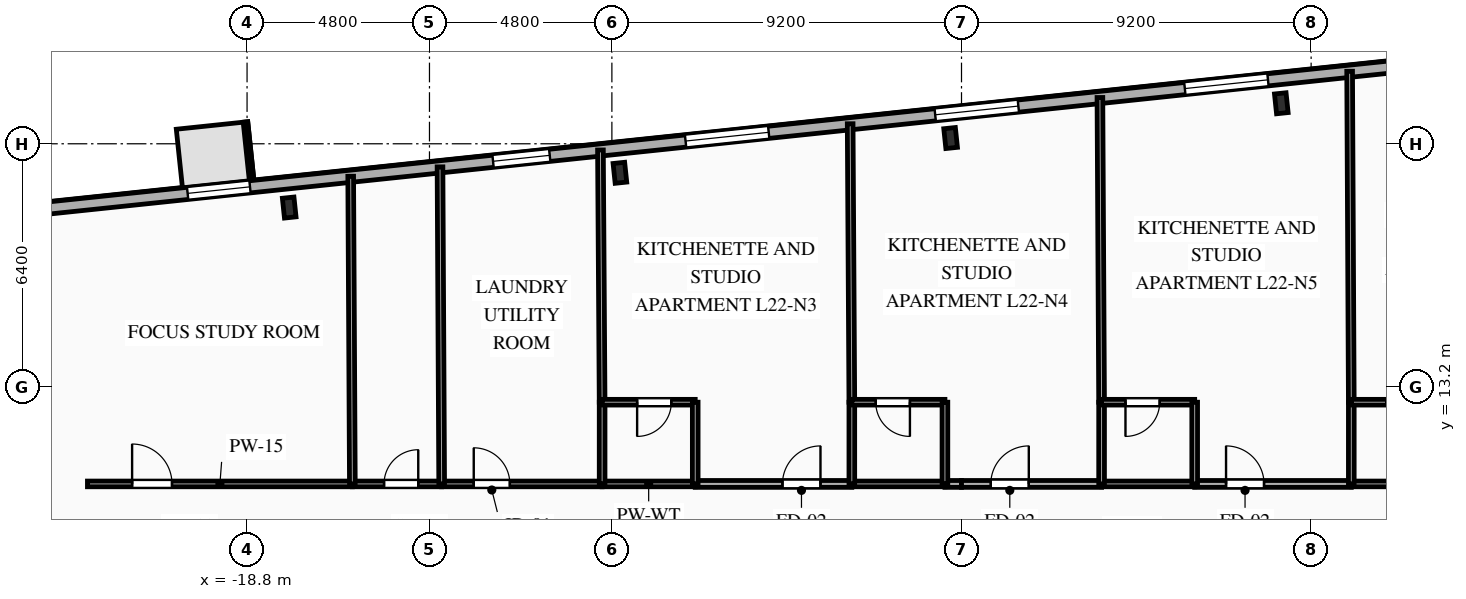
"""IFC4 building model, lengths in metres.
Left out: names, types, materials, properties, quantities, classifications, styles, units other than length and angle.
Written with IfcOpenShell. Run it as: python <this file> out.ifc"""

import sys

from ifc_helpers import new_model, si_unit, direction, frame, frame_2d, origin, origin_2d, place, context, subcontext, project, spatial, rectangle, i_section, extrude, element, fill, save


model = new_model("IFC4")
c1 = context("Model", 3, precision=1e-05, world=origin(), true_north=direction((0.0, 1.0)))
c2 = subcontext(c1, "Body", "Model", "MODEL_VIEW")
j1 = project(units=[si_unit("LENGTHUNIT", "METRE"), si_unit("PLANEANGLEUNIT", "RADIAN")], contexts=[c1])
p1 = place(None, origin())
s1 = spatial("IfcSite", under=j1, at=p1, CompositionType="ELEMENT")
p2 = place(p1, origin())
s2 = spatial("IfcBuilding", under=s1, at=p2, CompositionType="ELEMENT")
p3 = place(p2, frame((0.0, 0.0, 82.35)))
s3 = spatial("IfcBuildingStorey", under=s2, at=p3, CompositionType="ELEMENT", Elevation=82.35)
for number, where, z_axis, x_axis in (
    (1, (8.415, 20.666, 0.0), (0.0, 0.0, 1.0), (0.995, 0.105, 0.0)),
    (2, (-0.287, 19.751, 0.0), (0.0, 0.0, 1.0), (0.995, 0.105, 0.0)),
    (3, (-8.989, 18.836, 0.0), (0.0, 0.0, 1.0), (0.995, 0.105, 0.0)),
    (4, (-17.691, 17.922, 0.0), (0.0, 0.0, 1.0), (0.995, 0.105, 0.0)),
):
    element("IfcColumn", number, at=place(p3, frame(where, z_axis=z_axis, x_axis=x_axis)), inside=s3, PredefinedType="COLUMN", context=c2, shape_type="SweptSolid", body=[
        extrude(i_section(OverallWidth=0.306, OverallDepth=0.524, WebThickness=0.021, FlangeThickness=0.04, FilletRadius=0.027, at=origin_2d()), origin(), (0.0, 0.0, 1.0), 3.35),
    ])
p4 = place(p3, frame((-27.107, 17.586, 0.0), z_axis=(0.0, 0.0, 1.0), x_axis=(0.994521628355, 0.104531003701, 0.0)))
e5 = element("IfcWall", 5, at=p4, inside=s3, PredefinedType="SOLIDWALL", context=c2, shape_type="SweptSolid", body=[
    extrude(rectangle(XDim=53.8, YDim=0.32, at=frame_2d((26.9, 0.0))), origin(), (0.0, 0.0, 1.0), 3.045),
])
p5 = place(p4, frame((6.781, 0.0, 0.85)))
e6 = element("IfcOpeningElement", 6, at=p5, cuts=e5, PredefinedType="OPENING", context=c2, shape_type="SweptSolid", body=[
    extrude(rectangle(XDim=1.65, YDim=1.85, at=frame_2d((0.825, 0.925))), frame((0.0, 0.17, 0.0), z_axis=(0.0, -1.0, 0.0), x_axis=(1.0, 0.0, 0.0)), (0.0, 0.0, 1.0), 0.34),
])
p6 = place(p4, frame((14.862, 0.0, 0.85)))
e7 = element("IfcOpeningElement", 7, at=p6, cuts=e5, PredefinedType="OPENING", context=c2, shape_type="SweptSolid", body=[
    extrude(rectangle(XDim=1.5, YDim=1.85, at=frame_2d((0.75, 0.925))), frame((0.0, 0.17, 0.0), z_axis=(0.0, -1.0, 0.0), x_axis=(1.0, 0.0, 0.0)), (0.0, 0.0, 1.0), 0.34),
])
p7 = place(p4, frame((19.956, 0.0, 0.85)))
e8 = element("IfcOpeningElement", 8, at=p7, cuts=e5, PredefinedType="OPENING", context=c2, shape_type="SweptSolid", body=[
    extrude(rectangle(XDim=2.2, YDim=1.85, at=frame_2d((1.1, 0.925))), frame((0.0, 0.17, 0.0), z_axis=(0.0, -1.0, 0.0), x_axis=(1.0, 0.0, 0.0)), (0.0, 0.0, 1.0), 0.34),
])
p8 = place(p4, frame((26.561, 0.0, 0.85)))
e9 = element("IfcOpeningElement", 9, at=p8, cuts=e5, PredefinedType="OPENING", context=c2, shape_type="SweptSolid", body=[
    extrude(rectangle(XDim=2.2, YDim=1.85, at=frame_2d((1.1, 0.925))), frame((0.0, 0.17, 0.0), z_axis=(0.0, -1.0, 0.0), x_axis=(1.0, 0.0, 0.0)), (0.0, 0.0, 1.0), 0.34),
])
p9 = place(p4, frame((33.166, 0.0, 0.85)))
e10 = element("IfcOpeningElement", 10, at=p9, cuts=e5, PredefinedType="OPENING", context=c2, shape_type="SweptSolid", body=[
    extrude(rectangle(XDim=2.2, YDim=1.85, at=frame_2d((1.1, 0.925))), frame((0.0, 0.17, 0.0), z_axis=(0.0, -1.0, 0.0), x_axis=(1.0, 0.0, 0.0)), (0.0, 0.0, 1.0), 0.34),
])
p10 = place(p4, frame((39.771, 0.0, 0.85)))
e11 = element("IfcOpeningElement", 11, at=p10, cuts=e5, PredefinedType="OPENING", context=c2, shape_type="SweptSolid", body=[
    extrude(rectangle(XDim=2.2, YDim=1.85, at=frame_2d((1.1, 0.925))), frame((0.0, 0.17, 0.0), z_axis=(0.0, -1.0, 0.0), x_axis=(1.0, 0.0, 0.0)), (0.0, 0.0, 1.0), 0.34),
])
p11 = place(p4, frame((46.45, 0.0, 0.85)))
e12 = element("IfcOpeningElement", 12, at=p11, cuts=e5, PredefinedType="OPENING", context=c2, shape_type="SweptSolid", body=[
    extrude(rectangle(XDim=1.65, YDim=1.85, at=frame_2d((0.825, 0.925))), frame((0.0, 0.17, 0.0), z_axis=(0.0, -1.0, 0.0), x_axis=(1.0, 0.0, 0.0)), (0.0, 0.0, 1.0), 0.34),
])
p12 = place(p3, frame((-23.0, 10.65, 0.0), z_axis=(0.0, 0.0, 1.0), x_axis=(1.0, 0.0, 0.0)))
e13 = element("IfcWall", 13, at=p12, inside=s3, PredefinedType="PARTITIONING", context=c2, shape_type="SweptSolid", body=[
    extrude(rectangle(XDim=6.971, YDim=0.15, at=frame_2d((3.485, 0.0))), origin(), (0.0, 0.0, 1.0), 3.045),
])
p13 = place(p12, frame((1.175, 0.0, 0.0)))
e14 = element("IfcOpeningElement", 14, at=p13, cuts=e13, PredefinedType="OPENING", context=c2, shape_type="SweptSolid", body=[
    extrude(rectangle(XDim=1.05, YDim=2.15, at=frame_2d((0.525, 1.075))), frame((0.0, 0.085, 0.0), z_axis=(0.0, -1.0, 0.0), x_axis=(1.0, 0.0, 0.0)), (0.0, 0.0, 1.0), 0.17),
])
p14 = place(p3, frame((-16.029, 10.65, 0.0), z_axis=(0.0, 0.0, 1.0), x_axis=(1.0, 0.0, 0.0)))
e15 = element("IfcWall", 15, at=p14, inside=s3, PredefinedType="PLUMBINGWALL", context=c2, shape_type="SweptSolid", body=[
    extrude(rectangle(XDim=2.35, YDim=0.15, at=frame_2d((1.175, 0.0))), origin(), (0.0, 0.0, 1.0), 3.045),
])
p15 = place(p14, frame((0.834, 0.0, 0.0)))
e16 = element("IfcOpeningElement", 16, at=p15, cuts=e15, PredefinedType="OPENING", context=c2, shape_type="SweptSolid", body=[
    extrude(rectangle(XDim=0.9, YDim=2.1, at=frame_2d((0.45, 1.05))), frame((0.0, 0.085, 0.0), z_axis=(0.0, -1.0, 0.0), x_axis=(1.0, 0.0, 0.0)), (0.0, 0.0, 1.0), 0.17),
])
p16 = place(p3, frame((-13.679, 10.65, 0.0), z_axis=(0.0, 0.0, 1.0), x_axis=(1.0, 0.0, 0.0)))
e17 = element("IfcWall", 17, at=p16, inside=s3, PredefinedType="PARTITIONING", context=c2, shape_type="SweptSolid", body=[
    extrude(rectangle(XDim=4.222, YDim=0.15, at=frame_2d((2.111, 0.0))), origin(), (0.0, 0.0, 1.0), 3.045),
])
p17 = place(p16, frame((0.844, 0.0, 0.0)))
e18 = element("IfcOpeningElement", 18, at=p17, cuts=e17, PredefinedType="OPENING", context=c2, shape_type="SweptSolid", body=[
    extrude(rectangle(XDim=0.95, YDim=2.1, at=frame_2d((0.475, 1.05))), frame((0.0, 0.085, 0.0), z_axis=(0.0, -1.0, 0.0), x_axis=(1.0, 0.0, 0.0)), (0.0, 0.0, 1.0), 0.17),
])
p18 = place(p3, frame((-7.007, 10.65, 0.0), z_axis=(0.0, 0.0, 1.0), x_axis=(1.0, 0.0, 0.0)))
e19 = element("IfcWall", 19, at=p18, inside=s3, PredefinedType="PARTITIONING", context=c2, shape_type="SweptSolid", body=[
    extrude(rectangle(XDim=4.121, YDim=0.18, at=frame_2d((2.061, 0.0))), origin(), (0.0, 0.0, 1.0), 3.045),
])
p19 = place(p18, frame((2.296, 0.0, 0.0)))
e20 = element("IfcOpeningElement", 20, at=p19, cuts=e19, PredefinedType="OPENING", context=c2, shape_type="SweptSolid", body=[
    extrude(rectangle(XDim=1.0, YDim=2.15, at=frame_2d((0.5, 1.075))), frame((0.0, 0.1, 0.0), z_axis=(0.0, -1.0, 0.0), x_axis=(1.0, 0.0, 0.0)), (0.0, 0.0, 1.0), 0.2),
])
p20 = place(p3, frame((-9.457, 10.65, 0.0), z_axis=(0.0, 0.0, 1.0), x_axis=(1.0, 0.0, 0.0)))
e21 = element("IfcWall", 21, at=p20, inside=s3, PredefinedType="PLUMBINGWALL", context=c2, shape_type="SweptSolid", body=[
    extrude(rectangle(XDim=2.45, YDim=0.15, at=frame_2d((1.225, 0.0))), origin(), (0.0, 0.0, 1.0), 3.045),
])
p21 = place(p3, frame((-0.436, 10.65, 0.0), z_axis=(0.0, 0.0, 1.0), x_axis=(1.0, 0.0, 0.0)))
e22 = element("IfcWall", 22, at=p21, inside=s3, PredefinedType="PARTITIONING", context=c2, shape_type="SweptSolid", body=[
    extrude(rectangle(XDim=0.436, YDim=0.18, at=frame_2d((0.218, 0.0))), origin(), (0.0, 0.0, 1.0), 3.045),
])
p22 = place(p3, frame((-2.886, 10.65, 0.0), z_axis=(0.0, 0.0, 1.0), x_axis=(1.0, 0.0, 0.0)))
e23 = element("IfcWall", 23, at=p22, inside=s3, PredefinedType="PLUMBINGWALL", context=c2, shape_type="SweptSolid", body=[
    extrude(rectangle(XDim=2.45, YDim=0.15, at=frame_2d((1.225, 0.0))), origin(), (0.0, 0.0, 1.0), 3.045),
])
p23 = place(p3, frame((0.0, 10.65, 0.0), z_axis=(0.0, 0.0, 1.0), x_axis=(1.0, 0.0, 0.0)))
e24 = element("IfcWall", 24, at=p23, inside=s3, PredefinedType="PARTITIONING", context=c2, shape_type="SweptSolid", body=[
    extrude(rectangle(XDim=3.686, YDim=0.18, at=frame_2d((1.843, 0.0))), origin(), (0.0, 0.0, 1.0), 3.045),
])
p24 = place(p23, frame((0.771, 0.0, 0.0)))
e25 = element("IfcOpeningElement", 25, at=p24, cuts=e24, PredefinedType="OPENING", context=c2, shape_type="SweptSolid", body=[
    extrude(rectangle(XDim=1.0, YDim=2.15, at=frame_2d((0.5, 1.075))), frame((0.0, 0.1, 0.0), z_axis=(0.0, -1.0, 0.0), x_axis=(1.0, 0.0, 0.0)), (0.0, 0.0, 1.0), 0.2),
])
p25 = place(p3, frame((6.136, 10.65, 0.0), z_axis=(0.0, 0.0, 1.0), x_axis=(1.0, 0.0, 0.0)))
e26 = element("IfcWall", 26, at=p25, inside=s3, PredefinedType="PARTITIONING", context=c2, shape_type="SweptSolid", body=[
    extrude(rectangle(XDim=4.121, YDim=0.18, at=frame_2d((2.061, 0.0))), origin(), (0.0, 0.0, 1.0), 3.045),
])
p26 = place(p25, frame((0.825, 0.0, 0.0)))
e27 = element("IfcOpeningElement", 27, at=p26, cuts=e26, PredefinedType="OPENING", context=c2, shape_type="SweptSolid", body=[
    extrude(rectangle(XDim=1.0, YDim=2.15, at=frame_2d((0.5, 1.075))), frame((0.0, 0.1, 0.0), z_axis=(0.0, -1.0, 0.0), x_axis=(1.0, 0.0, 0.0)), (0.0, 0.0, 1.0), 0.2),
])
for number, where, z_axis, x_axis in (
    (28, (3.686, 10.65, 0.0), (0.0, 0.0, 1.0), (1.0, 0.0, 0.0)),
    (29, (10.257, 10.65, 0.0), (0.0, 0.0, 1.0), (1.0, 0.0, 0.0)),
):
    element("IfcWall", number, at=place(p3, frame(where, z_axis=z_axis, x_axis=x_axis)), inside=s3, PredefinedType="PLUMBINGWALL", context=c2, shape_type="SweptSolid", body=[
        extrude(rectangle(XDim=2.45, YDim=0.15, at=frame_2d((1.225, 0.0))), origin(), (0.0, 0.0, 1.0), 3.045),
    ])
p27 = place(p3, frame((-16.073, 18.746, 0.0), z_axis=(0.0, 0.0, 1.0), x_axis=(0.005428146808, -0.999985267503, 0.0)))
e30 = element("IfcWall", 30, at=p27, inside=s3, PredefinedType="PLUMBINGWALL", context=c2, shape_type="SweptSolid", body=[
    extrude(rectangle(XDim=8.096, YDim=0.15, at=frame_2d((4.048, 0.0))), origin(), (0.0, 0.0, 1.0), 3.045),
])
p28 = place(p3, frame((-13.723, 18.992, 0.0), z_axis=(0.0, 0.0, 1.0), x_axis=(0.005267551513, -0.999986126354, 0.0)))
e31 = element("IfcWall", 31, at=p28, inside=s3, PredefinedType="PLUMBINGWALL", context=c2, shape_type="SweptSolid", body=[
    extrude(rectangle(XDim=8.343, YDim=0.15, at=frame_2d((4.171, 0.0))), origin(), (0.0, 0.0, 1.0), 3.045),
])
p29 = place(p3, frame((-9.501, 19.436, 0.0), z_axis=(0.0, 0.0, 1.0), x_axis=(0.006621884097, -0.999978075085, 0.0)))
e32 = element("IfcWall", 32, at=p29, inside=s3, PredefinedType="PARTITIONING", context=c2, shape_type="SweptSolid", body=[
    extrude(rectangle(XDim=6.636, YDim=0.15, at=frame_2d((3.318, 0.0))), origin(), (0.0, 0.0, 1.0), 3.045),
])
p30 = place(p3, frame((-9.457, 12.8, 0.0), z_axis=(0.0, 0.0, 1.0), x_axis=(0.0, -1.0, 0.0)))
e33 = element("IfcWall", 33, at=p30, inside=s3, PredefinedType="PLUMBINGWALL", context=c2, shape_type="SweptSolid", body=[
    extrude(rectangle(XDim=2.15, YDim=0.15, at=frame_2d((1.075, 0.0))), origin(), (0.0, 0.0, 1.0), 3.045),
])
p31 = place(p3, frame((-7.007, 12.8, 0.0), z_axis=(0.0, 0.0, 1.0), x_axis=(-1.0, 0.0, 0.0)))
e34 = element("IfcWall", 34, at=p31, inside=s3, PredefinedType="PLUMBINGWALL", context=c2, shape_type="SweptSolid", body=[
    extrude(rectangle(XDim=2.45, YDim=0.15, at=frame_2d((1.225, 0.0))), origin(), (0.0, 0.0, 1.0), 3.045),
])
p32 = place(p31, frame((0.629, 0.0, 0.0)))
e35 = element("IfcOpeningElement", 35, at=p32, cuts=e34, PredefinedType="OPENING", context=c2, shape_type="SweptSolid", body=[
    extrude(rectangle(XDim=0.9, YDim=2.1, at=frame_2d((0.45, 1.05))), frame((0.0, 0.085, 0.0), z_axis=(0.0, -1.0, 0.0), x_axis=(1.0, 0.0, 0.0)), (0.0, 0.0, 1.0), 0.17),
])
p33 = place(p3, frame((-7.007, 10.65, 0.0), z_axis=(0.0, 0.0, 1.0), x_axis=(0.0, 1.0, 0.0)))
e36 = element("IfcWall", 36, at=p33, inside=s3, PredefinedType="PLUMBINGWALL", context=c2, shape_type="SweptSolid", body=[
    extrude(rectangle(XDim=2.15, YDim=0.15, at=frame_2d((1.075, 0.0))), origin(), (0.0, 0.0, 1.0), 3.045),
])
p34 = place(p3, frame((-2.93, 20.127, 0.0), z_axis=(0.0, 0.0, 1.0), x_axis=(0.005997692928, -0.999982013678, 0.0)))
e37 = element("IfcWall", 37, at=p34, inside=s3, PredefinedType="PARTITIONING", context=c2, shape_type="SweptSolid", body=[
    extrude(rectangle(XDim=7.327, YDim=0.15, at=frame_2d((3.664, 0.0))), origin(), (0.0, 0.0, 1.0), 3.045),
])
p35 = place(p3, frame((-2.886, 12.8, 0.0), z_axis=(0.0, 0.0, 1.0), x_axis=(0.0, -1.0, 0.0)))
e38 = element("IfcWall", 38, at=p35, inside=s3, PredefinedType="PLUMBINGWALL", context=c2, shape_type="SweptSolid", body=[
    extrude(rectangle(XDim=2.15, YDim=0.15, at=frame_2d((1.075, 0.0))), origin(), (0.0, 0.0, 1.0), 3.045),
])
p36 = place(p3, frame((-0.436, 12.8, 0.0), z_axis=(0.0, 0.0, 1.0), x_axis=(-1.0, 0.0, 0.0)))
e39 = element("IfcWall", 39, at=p36, inside=s3, PredefinedType="PLUMBINGWALL", context=c2, shape_type="SweptSolid", body=[
    extrude(rectangle(XDim=2.45, YDim=0.15, at=frame_2d((1.225, 0.0))), origin(), (0.0, 0.0, 1.0), 3.045),
])
p37 = place(p36, frame((0.921, 0.0, 0.0)))
e40 = element("IfcOpeningElement", 40, at=p37, cuts=e39, PredefinedType="OPENING", context=c2, shape_type="SweptSolid", body=[
    extrude(rectangle(XDim=0.9, YDim=2.1, at=frame_2d((0.45, 1.05))), frame((0.0, 0.085, 0.0), z_axis=(0.0, -1.0, 0.0), x_axis=(1.0, 0.0, 0.0)), (0.0, 0.0, 1.0), 0.17),
])
p38 = place(p3, frame((-0.436, 10.65, 0.0), z_axis=(0.0, 0.0, 1.0), x_axis=(0.0, 1.0, 0.0)))
e41 = element("IfcWall", 41, at=p38, inside=s3, PredefinedType="PLUMBINGWALL", context=c2, shape_type="SweptSolid", body=[
    extrude(rectangle(XDim=2.15, YDim=0.15, at=frame_2d((1.075, 0.0))), origin(), (0.0, 0.0, 1.0), 3.045),
])
p39 = place(p3, frame((3.642, 20.818, 0.0), z_axis=(0.0, 0.0, 1.0), x_axis=(0.005481038253, -0.999984978997, 0.0)))
e42 = element("IfcWall", 42, at=p39, inside=s3, PredefinedType="PARTITIONING", context=c2, shape_type="SweptSolid", body=[
    extrude(rectangle(XDim=8.018, YDim=0.15, at=frame_2d((4.009, 0.0))), origin(), (0.0, 0.0, 1.0), 3.045),
])
p40 = place(p3, frame((3.686, 12.8, 0.0), z_axis=(0.0, 0.0, 1.0), x_axis=(0.0, -1.0, 0.0)))
e43 = element("IfcWall", 43, at=p40, inside=s3, PredefinedType="PLUMBINGWALL", context=c2, shape_type="SweptSolid", body=[
    extrude(rectangle(XDim=2.15, YDim=0.15, at=frame_2d((1.075, 0.0))), origin(), (0.0, 0.0, 1.0), 3.045),
])
p41 = place(p3, frame((6.136, 12.8, 0.0), z_axis=(0.0, 0.0, 1.0), x_axis=(-1.0, 0.0, 0.0)))
e44 = element("IfcWall", 44, at=p41, inside=s3, PredefinedType="PLUMBINGWALL", context=c2, shape_type="SweptSolid", body=[
    extrude(rectangle(XDim=2.45, YDim=0.15, at=frame_2d((1.225, 0.0))), origin(), (0.0, 0.0, 1.0), 3.045),
])
p42 = place(p41, frame((0.921, 0.0, 0.0)))
e45 = element("IfcOpeningElement", 45, at=p42, cuts=e44, PredefinedType="OPENING", context=c2, shape_type="SweptSolid", body=[
    extrude(rectangle(XDim=0.9, YDim=2.1, at=frame_2d((0.45, 1.05))), frame((0.0, 0.085, 0.0), z_axis=(0.0, -1.0, 0.0), x_axis=(1.0, 0.0, 0.0)), (0.0, 0.0, 1.0), 0.17),
])
p43 = place(p3, frame((6.136, 10.65, 0.0), z_axis=(0.0, 0.0, 1.0), x_axis=(0.0, 1.0, 0.0)))
e46 = element("IfcWall", 46, at=p43, inside=s3, PredefinedType="PLUMBINGWALL", context=c2, shape_type="SweptSolid", body=[
    extrude(rectangle(XDim=2.15, YDim=0.15, at=frame_2d((1.075, 0.0))), origin(), (0.0, 0.0, 1.0), 3.045),
])
p44 = place(p3, frame((10.213, 21.508, 0.0), z_axis=(0.0, 0.0, 1.0), x_axis=(0.005046334579, -0.999987267173, 0.0)))
e47 = element("IfcWall", 47, at=p44, inside=s3, PredefinedType="PARTITIONING", context=c2, shape_type="SweptSolid", body=[
    extrude(rectangle(XDim=8.708, YDim=0.15, at=frame_2d((4.354, 0.0))), origin(), (0.0, 0.0, 1.0), 3.045),
])
p45 = place(p3, frame((10.257, 12.8, 0.0), z_axis=(0.0, 0.0, 1.0), x_axis=(0.0, -1.0, 0.0)))
e48 = element("IfcWall", 48, at=p45, inside=s3, PredefinedType="PLUMBINGWALL", context=c2, shape_type="SweptSolid", body=[
    extrude(rectangle(XDim=2.15, YDim=0.15, at=frame_2d((1.075, 0.0))), origin(), (0.0, 0.0, 1.0), 3.045),
])
p46 = place(p3, frame((12.707, 12.8, 0.0), z_axis=(0.0, 0.0, 1.0), x_axis=(-1.0, 0.0, 0.0)))
e49 = element("IfcWall", 49, at=p46, inside=s3, PredefinedType="PLUMBINGWALL", context=c2, shape_type="SweptSolid", body=[
    extrude(rectangle(XDim=2.45, YDim=0.15, at=frame_2d((1.225, 0.0))), origin(), (0.0, 0.0, 1.0), 3.045),
])
p47 = place(p46, frame((0.629, 0.0, 0.0)))
e50 = element("IfcOpeningElement", 50, at=p47, cuts=e49, PredefinedType="OPENING", context=c2, shape_type="SweptSolid", body=[
    extrude(rectangle(XDim=0.9, YDim=2.1, at=frame_2d((0.45, 1.05))), frame((0.0, 0.085, 0.0), z_axis=(0.0, -1.0, 0.0), x_axis=(1.0, 0.0, 0.0)), (0.0, 0.0, 1.0), 0.17),
])
p48 = place(p5, origin())
e51 = element("IfcWindow", 51, at=p48, inside=s3, PartitioningType="SINGLE_PANEL", PredefinedType="WINDOW", context=c2, shape_type="SweptSolid", body=[
    extrude(rectangle(XDim=1.65, YDim=1.85, at=frame_2d((0.825, 0.925))), frame((0.0, 0.03, 0.0), z_axis=(0.0, -1.0, 0.0), x_axis=(1.0, 0.0, 0.0)), (0.0, 0.0, 1.0), 0.06),
])
fill(e6, e51)
p49 = place(p6, origin())
e52 = element("IfcWindow", 52, at=p49, inside=s3, PartitioningType="SINGLE_PANEL", PredefinedType="WINDOW", context=c2, shape_type="SweptSolid", body=[
    extrude(rectangle(XDim=1.5, YDim=1.85, at=frame_2d((0.75, 0.925))), frame((0.0, 0.03, 0.0), z_axis=(0.0, -1.0, 0.0), x_axis=(1.0, 0.0, 0.0)), (0.0, 0.0, 1.0), 0.06),
])
fill(e7, e52)
p50 = place(p7, origin())
e53 = element("IfcWindow", 53, at=p50, inside=s3, PartitioningType="SINGLE_PANEL", PredefinedType="WINDOW", context=c2, shape_type="SweptSolid", body=[
    extrude(rectangle(XDim=2.2, YDim=1.85, at=frame_2d((1.1, 0.925))), frame((0.0, 0.03, 0.0), z_axis=(0.0, -1.0, 0.0), x_axis=(1.0, 0.0, 0.0)), (0.0, 0.0, 1.0), 0.06),
])
fill(e8, e53)
p51 = place(p8, origin())
e54 = element("IfcWindow", 54, at=p51, inside=s3, PartitioningType="SINGLE_PANEL", PredefinedType="WINDOW", context=c2, shape_type="SweptSolid", body=[
    extrude(rectangle(XDim=2.2, YDim=1.85, at=frame_2d((1.1, 0.925))), frame((0.0, 0.03, 0.0), z_axis=(0.0, -1.0, 0.0), x_axis=(1.0, 0.0, 0.0)), (0.0, 0.0, 1.0), 0.06),
])
fill(e9, e54)
p52 = place(p9, origin())
e55 = element("IfcWindow", 55, at=p52, inside=s3, PartitioningType="SINGLE_PANEL", PredefinedType="WINDOW", context=c2, shape_type="SweptSolid", body=[
    extrude(rectangle(XDim=2.2, YDim=1.85, at=frame_2d((1.1, 0.925))), frame((0.0, 0.03, 0.0), z_axis=(0.0, -1.0, 0.0), x_axis=(1.0, 0.0, 0.0)), (0.0, 0.0, 1.0), 0.06),
])
fill(e10, e55)
p53 = place(p13, origin())
e56 = element("IfcDoor", 56, at=p53, inside=s3, OperationType="SINGLE_SWING_LEFT", PredefinedType="DOOR", context=c2, shape_type="SweptSolid", body=[
    extrude(rectangle(XDim=1.05, YDim=2.15, at=frame_2d((0.525, 1.075))), frame((0.0, 0.025, 0.0), z_axis=(0.0, -1.0, 0.0), x_axis=(1.0, 0.0, 0.0)), (0.0, 0.0, 1.0), 0.05),
])
fill(e14, e56)
p54 = place(p15, origin())
e57 = element("IfcDoor", 57, at=p54, inside=s3, OperationType="SINGLE_SWING_RIGHT", PredefinedType="DOOR", context=c2, shape_type="SweptSolid", body=[
    extrude(rectangle(XDim=0.9, YDim=2.1, at=frame_2d((0.45, 1.05))), frame((0.0, 0.025, 0.0), z_axis=(0.0, -1.0, 0.0), x_axis=(1.0, 0.0, 0.0)), (0.0, 0.0, 1.0), 0.05),
])
fill(e16, e57)
p55 = place(p17, origin())
e58 = element("IfcDoor", 58, at=p55, inside=s3, OperationType="SINGLE_SWING_LEFT", PredefinedType="DOOR", context=c2, shape_type="SweptSolid", body=[
    extrude(rectangle(XDim=0.95, YDim=2.1, at=frame_2d((0.475, 1.05))), frame((0.0, 0.025, 0.0), z_axis=(0.0, -1.0, 0.0), x_axis=(1.0, 0.0, 0.0)), (0.0, 0.0, 1.0), 0.05),
])
fill(e18, e58)
p56 = place(p19, origin())
e59 = element("IfcDoor", 59, at=p56, inside=s3, OperationType="SINGLE_SWING_RIGHT", PredefinedType="DOOR", context=c2, shape_type="SweptSolid", body=[
    extrude(rectangle(XDim=1.0, YDim=2.15, at=frame_2d((0.5, 1.075))), frame((0.0, 0.025, 0.0), z_axis=(0.0, -1.0, 0.0), x_axis=(1.0, 0.0, 0.0)), (0.0, 0.0, 1.0), 0.05),
])
fill(e20, e59)
p57 = place(p24, origin())
e60 = element("IfcDoor", 60, at=p57, inside=s3, OperationType="SINGLE_SWING_RIGHT", PredefinedType="DOOR", context=c2, shape_type="SweptSolid", body=[
    extrude(rectangle(XDim=1.0, YDim=2.15, at=frame_2d((0.5, 1.075))), frame((0.0, 0.025, 0.0), z_axis=(0.0, -1.0, 0.0), x_axis=(1.0, 0.0, 0.0)), (0.0, 0.0, 1.0), 0.05),
])
fill(e25, e60)
p58 = place(p26, origin())
e61 = element("IfcDoor", 61, at=p58, inside=s3, OperationType="SINGLE_SWING_LEFT", PredefinedType="DOOR", context=c2, shape_type="SweptSolid", body=[
    extrude(rectangle(XDim=1.0, YDim=2.15, at=frame_2d((0.5, 1.075))), frame((0.0, 0.025, 0.0), z_axis=(0.0, -1.0, 0.0), x_axis=(1.0, 0.0, 0.0)), (0.0, 0.0, 1.0), 0.05),
])
fill(e27, e61)
p59 = place(p32, origin())
e62 = element("IfcDoor", 62, at=p59, inside=s3, OperationType="SINGLE_SWING_RIGHT", PredefinedType="DOOR", context=c2, shape_type="SweptSolid", body=[
    extrude(rectangle(XDim=0.9, YDim=2.1, at=frame_2d((0.45, 1.05))), frame((0.0, 0.025, 0.0), z_axis=(0.0, -1.0, 0.0), x_axis=(1.0, 0.0, 0.0)), (0.0, 0.0, 1.0), 0.05),
])
fill(e35, e62)
p60 = place(p37, origin())
e63 = element("IfcDoor", 63, at=p60, inside=s3, OperationType="SINGLE_SWING_LEFT", PredefinedType="DOOR", context=c2, shape_type="SweptSolid", body=[
    extrude(rectangle(XDim=0.9, YDim=2.1, at=frame_2d((0.45, 1.05))), frame((0.0, 0.025, 0.0), z_axis=(0.0, -1.0, 0.0), x_axis=(1.0, 0.0, 0.0)), (0.0, 0.0, 1.0), 0.05),
])
fill(e40, e63)
p61 = place(p42, origin())
e64 = element("IfcDoor", 64, at=p61, inside=s3, OperationType="SINGLE_SWING_RIGHT", PredefinedType="DOOR", context=c2, shape_type="SweptSolid", body=[
    extrude(rectangle(XDim=0.9, YDim=2.1, at=frame_2d((0.45, 1.05))), frame((0.0, 0.025, 0.0), z_axis=(0.0, -1.0, 0.0), x_axis=(1.0, 0.0, 0.0)), (0.0, 0.0, 1.0), 0.05),
])
fill(e45, e64)
p62 = place(p47, origin())
e65 = element("IfcDoor", 65, at=p62, inside=s3, OperationType="SINGLE_SWING_LEFT", PredefinedType="DOOR", context=c2, shape_type="SweptSolid", body=[
    extrude(rectangle(XDim=0.9, YDim=2.1, at=frame_2d((0.45, 1.05))), frame((0.0, 0.025, 0.0), z_axis=(0.0, -1.0, 0.0), x_axis=(1.0, 0.0, 0.0)), (0.0, 0.0, 1.0), 0.05),
])
fill(e50, e65)
save(model, sys.argv[1])
